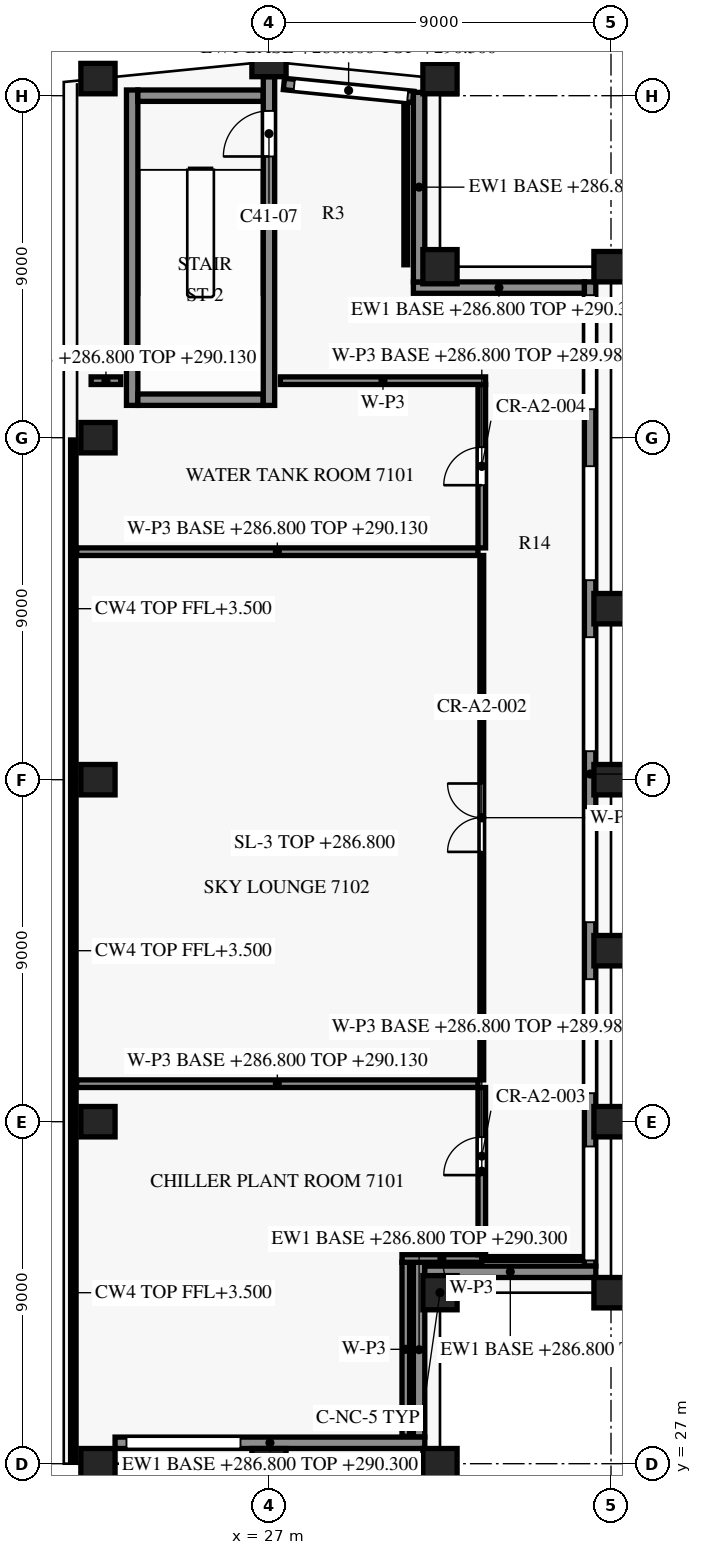
"""IFC4 building model, lengths in metres.
Left out: names, types, materials, properties, quantities, classifications, styles, units other than length and angle.
Written with IfcOpenShell. Run it as: python <this file> out.ifc"""

import sys

from ifc_helpers import new_model, si_unit, direction, frame, frame_2d, origin, origin_2d, place, context, subcontext, project, spatial, rectangle, extrude, element, fill, save


model = new_model("IFC4")
c1 = context("Model", 3, precision=1e-05, world=origin(), true_north=direction((0.0, 1.0)))
c2 = subcontext(c1, "Body", "Model", "MODEL_VIEW")
j1 = project(units=[si_unit("LENGTHUNIT", "METRE"), si_unit("PLANEANGLEUNIT", "RADIAN")], contexts=[c1])
p1 = place(None, origin())
s1 = spatial("IfcSite", under=j1, at=p1, CompositionType="ELEMENT")
p2 = place(p1, origin())
s2 = spatial("IfcBuilding", under=s1, at=p2, CompositionType="ELEMENT")
p3 = place(p2, frame((0.0, 0.0, 286.8)))
s3 = spatial("IfcBuildingStorey", under=s2, at=p3, CompositionType="ELEMENT", Elevation=286.8)
for number, where, z_axis, x_axis in (
    (1, (36.0, 31.5, 0.0), (0.0, 0.0, 1.0), (0.0, 1.0, 0.0)),
    (2, (36.0, 36.0, 0.0), (0.0, 0.0, 1.0), (0.0, 1.0, 0.0)),
    (3, (36.0, 40.5, 0.0), (0.0, 0.0, 1.0), (0.0, 1.0, 0.0)),
    (4, (36.0, 45.0, 0.0), (0.0, 0.0, 1.0), (0.0, 1.0, 0.0)),
    (5, (36.0, 49.5, 0.0), (0.0, 0.0, 1.0), (0.0, 1.0, 0.0)),
    (6, (36.0, 58.5, 0.0), (0.0, 0.0, 1.0), (0.0, 1.0, 0.0)),
    (7, (31.5, 63.45, 0.0), (0.0, 0.0, 1.0), (-0.995, 0.1, 0.0)),
    (8, (27.0, 63.9, 0.0), (0.0, 0.0, 1.0), (-1.0, 0.0, 0.0)),
    (9, (22.5, 63.45, 0.0), (0.0, 0.0, 1.0), (-0.995, -0.1, 0.0)),
    (10, (22.5, 54.0, 0.0), (0.0, 0.0, 1.0), (1.0, 0.0, 0.0)),
    (11, (22.5, 45.0, 0.0), (0.0, 0.0, 1.0), (1.0, 0.0, 0.0)),
    (12, (22.5, 36.0, 0.0), (0.0, 0.0, 1.0), (1.0, 0.0, 0.0)),
):
    element("IfcColumn", number, at=place(p3, frame(where, z_axis=z_axis, x_axis=x_axis)), inside=s3, PredefinedType="COLUMN", context=c2, shape_type="SweptSolid", body=[
        extrude(rectangle(XDim=0.9, YDim=0.8, at=origin_2d()), origin(), (0.0, 0.0, 1.0), 4.0),
    ])
for number, where, z_axis, x_axis in (
    (13, (31.5, 31.5, 0.0), (0.0, 0.0, 1.0), (1.0, 0.0, 0.0)),
    (14, (31.5, 58.5, 0.0), (0.0, 0.0, 1.0), (1.0, 0.0, 0.0)),
):
    element("IfcColumn", number, at=place(p3, frame(where, z_axis=z_axis, x_axis=x_axis)), inside=s3, PredefinedType="COLUMN", context=c2, shape_type="SweptSolid", body=[
        extrude(rectangle(XDim=0.9, YDim=0.9, at=origin_2d()), origin(), (0.0, 0.0, 1.0), 4.0),
    ])
for number, where, z_axis, x_axis in (
    (15, (22.5, 27.0, 0.0), (0.0, 0.0, 1.0), (1.0, 0.0, 0.0)),
    (16, (27.0, 27.0, 0.0), (0.0, 0.0, 1.0), (1.0, 0.0, 0.0)),
    (17, (31.5, 27.0, 0.0), (0.0, 0.0, 1.0), (1.0, 0.0, 0.0)),
):
    element("IfcColumn", number, at=place(p3, frame(where, z_axis=z_axis, x_axis=x_axis)), inside=s3, PredefinedType="COLUMN", context=c2, shape_type="SweptSolid", body=[
        extrude(rectangle(XDim=0.9, YDim=0.8, at=origin_2d()), origin(), (0.0, 0.0, 1.0), 4.0),
    ])
p4 = place(p3, frame((31.1, 27.55, 0.0), z_axis=(0.0, 0.0, 1.0), x_axis=(-1.0, 0.0, 0.0)))
e18 = element("IfcWall", 18, at=p4, inside=s3, PredefinedType="SOLIDWALL", context=c2, shape_type="SweptSolid", body=[
    extrude(rectangle(XDim=8.15, YDim=0.3, at=frame_2d((4.075, 0.0))), origin(), (0.0, 0.0, 1.0), 3.5),
])
p5 = place(p4, frame((4.85, 0.0, 0.9)))
e19 = element("IfcOpeningElement", 19, at=p5, cuts=e18, PredefinedType="OPENING", context=c2, shape_type="SweptSolid", body=[
    extrude(rectangle(XDim=3.0, YDim=1.8, at=frame_2d((1.5, 0.9))), frame((0.0, 0.16, 0.0), z_axis=(0.0, -1.0, 0.0), x_axis=(1.0, 0.0, 0.0)), (0.0, 0.0, 1.0), 0.32),
])
p6 = place(p3, frame((30.95, 32.3, 0.0), z_axis=(0.0, 0.0, 1.0), x_axis=(0.0, -1.0, 0.0)))
e20 = element("IfcWall", 20, at=p6, inside=s3, PredefinedType="SOLIDWALL", context=c2, shape_type="SweptSolid", body=[
    extrude(rectangle(XDim=4.6, YDim=0.3, at=frame_2d((2.3, 0.0))), origin(), (0.0, 0.0, 1.0), 3.5),
])
p7 = place(p3, frame((35.6, 32.05, 0.0), z_axis=(0.0, 0.0, 1.0), x_axis=(-1.0, 0.0, 0.0)))
e21 = element("IfcWall", 21, at=p7, inside=s3, PredefinedType="SOLIDWALL", context=c2, shape_type="SweptSolid", body=[
    extrude(rectangle(XDim=4.5, YDim=0.3, at=frame_2d((2.25, 0.0))), origin(), (0.0, 0.0, 1.0), 3.5),
])
p8 = place(p3, frame((35.45, 58.1, 0.0), z_axis=(0.0, 0.0, 1.0), x_axis=(0.0, -1.0, 0.0)))
e22 = element("IfcWall", 22, at=p8, inside=s3, PredefinedType="SOLIDWALL", context=c2, shape_type="SweptSolid", body=[
    extrude(rectangle(XDim=25.902, YDim=0.3, at=frame_2d((12.951, 0.0))), origin(), (0.0, 0.0, 1.0), 3.5),
])
p9 = place(p8, frame((0.35, 0.0, 0.9)))
e23 = element("IfcOpeningElement", 23, at=p9, cuts=e22, PredefinedType="OPENING", context=c2, shape_type="SweptSolid", body=[
    extrude(rectangle(XDim=3.0, YDim=1.8, at=frame_2d((1.5, 0.9))), frame((0.0, 0.16, 0.0), z_axis=(0.0, -1.0, 0.0), x_axis=(1.0, 0.0, 0.0)), (0.0, 0.0, 1.0), 0.32),
])
p10 = place(p8, frame((4.85, 0.0, 0.9)))
e24 = element("IfcOpeningElement", 24, at=p10, cuts=e22, PredefinedType="OPENING", context=c2, shape_type="SweptSolid", body=[
    extrude(rectangle(XDim=3.0, YDim=1.8, at=frame_2d((1.5, 0.9))), frame((0.0, 0.16, 0.0), z_axis=(0.0, -1.0, 0.0), x_axis=(1.0, 0.0, 0.0)), (0.0, 0.0, 1.0), 0.32),
])
p11 = place(p8, frame((9.35, 0.0, 0.9)))
e25 = element("IfcOpeningElement", 25, at=p11, cuts=e22, PredefinedType="OPENING", context=c2, shape_type="SweptSolid", body=[
    extrude(rectangle(XDim=3.0, YDim=1.8, at=frame_2d((1.5, 0.9))), frame((0.0, 0.16, 0.0), z_axis=(0.0, -1.0, 0.0), x_axis=(1.0, 0.0, 0.0)), (0.0, 0.0, 1.0), 0.32),
])
p12 = place(p8, frame((13.85, 0.0, 0.9)))
e26 = element("IfcOpeningElement", 26, at=p12, cuts=e22, PredefinedType="OPENING", context=c2, shape_type="SweptSolid", body=[
    extrude(rectangle(XDim=3.0, YDim=1.8, at=frame_2d((1.5, 0.9))), frame((0.0, 0.16, 0.0), z_axis=(0.0, -1.0, 0.0), x_axis=(1.0, 0.0, 0.0)), (0.0, 0.0, 1.0), 0.32),
])
p13 = place(p8, frame((18.35, 0.0, 0.9)))
e27 = element("IfcOpeningElement", 27, at=p13, cuts=e22, PredefinedType="OPENING", context=c2, shape_type="SweptSolid", body=[
    extrude(rectangle(XDim=3.0, YDim=1.8, at=frame_2d((1.5, 0.9))), frame((0.0, 0.16, 0.0), z_axis=(0.0, -1.0, 0.0), x_axis=(1.0, 0.0, 0.0)), (0.0, 0.0, 1.0), 0.32),
])
p14 = place(p8, frame((22.752, 0.0, 0.9)))
e28 = element("IfcOpeningElement", 28, at=p14, cuts=e22, PredefinedType="OPENING", context=c2, shape_type="SweptSolid", body=[
    extrude(rectangle(XDim=3.0, YDim=1.8, at=frame_2d((1.5, 0.9))), frame((0.0, 0.16, 0.0), z_axis=(0.0, -1.0, 0.0), x_axis=(1.0, 0.0, 0.0)), (0.0, 0.0, 1.0), 0.32),
])
p15 = place(p3, frame((30.8, 57.95, 0.0), z_axis=(0.0, 0.0, 1.0), x_axis=(1.0, 0.0, 0.0)))
e29 = element("IfcWall", 29, at=p15, inside=s3, PredefinedType="SOLIDWALL", context=c2, shape_type="SweptSolid", body=[
    extrude(rectangle(XDim=4.502, YDim=0.3, at=frame_2d((2.251, 0.0))), origin(), (0.0, 0.0, 1.0), 3.5),
])
p16 = place(p3, frame((30.95, 63.088, 0.0), z_axis=(0.0, 0.0, 1.0), x_axis=(0.0, -1.0, 0.0)))
e30 = element("IfcWall", 30, at=p16, inside=s3, PredefinedType="SOLIDWALL", context=c2, shape_type="SweptSolid", body=[
    extrude(rectangle(XDim=4.99, YDim=0.3, at=frame_2d((2.495, 0.0))), origin(), (0.0, 0.0, 1.0), 3.5),
])
p17 = place(p3, frame((27.393, 63.308, 0.0), z_axis=(0.0, 0.0, 1.0), x_axis=(0.995030125493, -0.099574340874, 0.0)))
e31 = element("IfcWall", 31, at=p17, inside=s3, PredefinedType="SOLIDWALL", context=c2, shape_type="SweptSolid", body=[
    extrude(rectangle(XDim=3.423, YDim=0.3, at=frame_2d((1.711, 0.0))), origin(), (0.0, 0.0, 1.0), 3.5),
])
p18 = place(p17, frame((0.273, 0.0, 0.9)))
e32 = element("IfcOpeningElement", 32, at=p18, cuts=e31, PredefinedType="OPENING", context=c2, shape_type="SweptSolid", body=[
    extrude(rectangle(XDim=3.0, YDim=1.8, at=frame_2d((1.5, 0.9))), frame((0.0, 0.16, 0.0), z_axis=(0.0, -1.0, 0.0), x_axis=(1.0, 0.0, 0.0)), (0.0, 0.0, 1.0), 0.32),
])
for number, where, z_axis, x_axis in (
    (33, (23.55, 55.0, 0.0), (0.0, 0.0, 1.0), (1.0, 0.0, 0.0)),
    (34, (23.55, 63.0, 0.0), (0.0, 0.0, 1.0), (1.0, 0.0, 0.0)),
):
    element("IfcWall", number, at=place(p3, frame(where, z_axis=z_axis, x_axis=x_axis)), inside=s3, PredefinedType="SHEAR", context=c2, shape_type="SweptSolid", body=[
        extrude(rectangle(XDim=3.3, YDim=0.3, at=frame_2d((1.65, 0.0))), origin(), (0.0, 0.0, 1.0), 3.7),
    ])
p19 = place(p3, frame((23.4, 54.85, 0.0), z_axis=(0.0, 0.0, 1.0), x_axis=(0.0, 1.0, 0.0)))
e35 = element("IfcWall", 35, at=p19, inside=s3, PredefinedType="SHEAR", context=c2, shape_type="SweptSolid", body=[
    extrude(rectangle(XDim=8.3, YDim=0.3, at=frame_2d((4.15, 0.0))), origin(), (0.0, 0.0, 1.0), 3.7),
])
p20 = place(p3, frame((27.0, 54.85, 0.0), z_axis=(0.0, 0.0, 1.0), x_axis=(0.0, 1.0, 0.0)))
e36 = element("IfcWall", 36, at=p20, inside=s3, PredefinedType="SHEAR", context=c2, shape_type="SweptSolid", body=[
    extrude(rectangle(XDim=8.65, YDim=0.3, at=frame_2d((4.325, 0.0))), origin(), (0.0, 0.0, 1.0), 3.7),
])
p21 = place(p20, frame((6.55, 0.0, 0.0)))
e37 = element("IfcOpeningElement", 37, at=p21, cuts=e36, PredefinedType="OPENING", context=c2, shape_type="SweptSolid", body=[
    extrude(rectangle(XDim=1.2, YDim=2.2, at=frame_2d((0.6, 1.1))), frame((0.0, 0.16, 0.0), z_axis=(0.0, -1.0, 0.0), x_axis=(1.0, 0.0, 0.0)), (0.0, 0.0, 1.0), 0.32),
])
p22 = place(p3, frame((30.6, 32.3, 0.0), z_axis=(0.0, 0.0, 1.0), x_axis=(0.0, -1.0, 0.0)))
e38 = element("IfcWall", 38, at=p22, inside=s3, PredefinedType="PARTITIONING", context=c2, shape_type="SweptSolid", body=[
    extrude(rectangle(XDim=4.58, YDim=0.2, at=frame_2d((2.29, 0.0))), origin(), (0.0, 0.0, 1.0), 3.68),
])
p23 = place(p3, frame((32.6, 32.4, 0.0), z_axis=(0.0, 0.0, 1.0), x_axis=(-1.0, 0.0, 0.0)))
e39 = element("IfcWall", 39, at=p23, inside=s3, PredefinedType="PARTITIONING", context=c2, shape_type="SweptSolid", body=[
    extrude(rectangle(XDim=2.1, YDim=0.2, at=frame_2d((1.05, 0.0))), origin(), (0.0, 0.0, 1.0), 3.68),
])
p24 = place(p3, frame((35.28, 32.4, 0.0), z_axis=(0.0, 0.0, 1.0), x_axis=(-1.0, 0.0, 0.0)))
e40 = element("IfcWall", 40, at=p24, inside=s3, PredefinedType="PARTITIONING", context=c2, shape_type="SweptSolid", body=[
    extrude(rectangle(XDim=2.68, YDim=0.1, at=frame_2d((1.34, 0.0))), origin(), (0.0, 0.0, 1.0), 3.68),
])
p25 = place(p3, frame((32.6, 32.5, 0.0), z_axis=(0.0, 0.0, 1.0), x_axis=(0.0, 1.0, 0.0)))
e41 = element("IfcWall", 41, at=p25, inside=s3, PredefinedType="PARTITIONING", context=c2, shape_type="SweptSolid", body=[
    extrude(rectangle(XDim=4.4, YDim=0.2, at=frame_2d((2.2, 0.0))), origin(), (0.0, 0.0, 1.0), 3.18),
])
p26 = place(p25, frame((2.094, 0.0, 0.0)))
e42 = element("IfcOpeningElement", 42, at=p26, cuts=e41, PredefinedType="OPENING", context=c2, shape_type="SweptSolid", body=[
    extrude(rectangle(XDim=1.0, YDim=2.1, at=frame_2d((0.5, 1.05))), frame((0.0, 0.11, 0.0), z_axis=(0.0, -1.0, 0.0), x_axis=(1.0, 0.0, 0.0)), (0.0, 0.0, 1.0), 0.22),
])
p27 = place(p3, frame((32.5, 37.0, 0.0), z_axis=(0.0, 0.0, 1.0), x_axis=(-1.0, 0.0, 0.0)))
e43 = element("IfcWall", 43, at=p27, inside=s3, PredefinedType="PARTITIONING", context=c2, shape_type="SweptSolid", body=[
    extrude(rectangle(XDim=10.56, YDim=0.2, at=frame_2d((5.28, 0.0))), origin(), (0.0, 0.0, 1.0), 3.33),
])
p28 = place(p3, frame((32.6, 37.1, 0.0), z_axis=(0.0, 0.0, 1.0), x_axis=(0.0, 1.0, 0.0)))
e44 = element("IfcWall", 44, at=p28, inside=s3, PredefinedType="PARTITIONING", context=c2, shape_type="SweptSolid", body=[
    extrude(rectangle(XDim=13.8, YDim=0.1, at=frame_2d((6.9, 0.0))), origin(), (0.0, 0.0, 1.0), 3.18),
])
p29 = place(p28, frame((6.0, 0.0, 0.0)))
e45 = element("IfcOpeningElement", 45, at=p29, cuts=e44, PredefinedType="OPENING", context=c2, shape_type="SweptSolid", body=[
    extrude(rectangle(XDim=1.8, YDim=2.1, at=frame_2d((0.9, 1.05))), frame((0.0, 0.06, 0.0), z_axis=(0.0, -1.0, 0.0), x_axis=(1.0, 0.0, 0.0)), (0.0, 0.0, 1.0), 0.12),
])
p30 = place(p3, frame((21.94, 51.0, 0.0), z_axis=(0.0, 0.0, 1.0), x_axis=(1.0, 0.0, 0.0)))
e46 = element("IfcWall", 46, at=p30, inside=s3, PredefinedType="PARTITIONING", context=c2, shape_type="SweptSolid", body=[
    extrude(rectangle(XDim=10.56, YDim=0.2, at=frame_2d((5.28, 0.0))), origin(), (0.0, 0.0, 1.0), 3.33),
])
p31 = place(p3, frame((32.6, 51.1, 0.0), z_axis=(0.0, 0.0, 1.0), x_axis=(0.0, 1.0, 0.0)))
e47 = element("IfcWall", 47, at=p31, inside=s3, PredefinedType="PARTITIONING", context=c2, shape_type="SweptSolid", body=[
    extrude(rectangle(XDim=4.3, YDim=0.2, at=frame_2d((2.15, 0.0))), origin(), (0.0, 0.0, 1.0), 3.18),
])
p32 = place(p31, frame((1.65, 0.0, 0.0)))
e48 = element("IfcOpeningElement", 48, at=p32, cuts=e47, PredefinedType="OPENING", context=c2, shape_type="SweptSolid", body=[
    extrude(rectangle(XDim=1.0, YDim=2.1, at=frame_2d((0.5, 1.05))), frame((0.0, 0.11, 0.0), z_axis=(0.0, -1.0, 0.0), x_axis=(1.0, 0.0, 0.0)), (0.0, 0.0, 1.0), 0.22),
])
p33 = place(p3, frame((22.32, 55.5, 0.0), z_axis=(0.0, 0.0, 1.0), x_axis=(1.0, 0.0, 0.0)))
e49 = element("IfcWall", 49, at=p33, inside=s3, PredefinedType="PARTITIONING", context=c2, shape_type="SweptSolid", body=[
    extrude(rectangle(XDim=0.78, YDim=0.2, at=frame_2d((0.39, 0.0))), origin(), (0.0, 0.0, 1.0), 3.33),
])
p34 = place(p3, frame((32.7, 55.5, 0.0), z_axis=(0.0, 0.0, 1.0), x_axis=(-1.0, 0.0, 0.0)))
e50 = element("IfcWall", 50, at=p34, inside=s3, PredefinedType="PARTITIONING", context=c2, shape_type="SweptSolid", body=[
    extrude(rectangle(XDim=5.4, YDim=0.2, at=frame_2d((2.7, 0.0))), origin(), (0.0, 0.0, 1.0), 3.68),
])
p35 = place(p3, frame((30.6, 62.816, 0.0), z_axis=(0.0, 0.0, 1.0), x_axis=(0.0, -1.0, 0.0)))
e51 = element("IfcWall", 51, at=p35, inside=s3, PredefinedType="PARTITIONING", context=c2, shape_type="SweptSolid", body=[
    extrude(rectangle(XDim=4.266, YDim=0.1, at=frame_2d((2.133, 0.0))), origin(), (0.0, 0.0, 1.0), 3.68),
])
p36 = place(p5, origin())
e52 = element("IfcWindow", 52, at=p36, inside=s3, PartitioningType="SINGLE_PANEL", PredefinedType="WINDOW", context=c2, shape_type="SweptSolid", body=[
    extrude(rectangle(XDim=3.0, YDim=1.8, at=frame_2d((1.5, 0.9))), frame((0.0, 0.03, 0.0), z_axis=(0.0, -1.0, 0.0), x_axis=(1.0, 0.0, 0.0)), (0.0, 0.0, 1.0), 0.06),
])
fill(e19, e52)
p37 = place(p9, origin())
e53 = element("IfcWindow", 53, at=p37, inside=s3, PartitioningType="SINGLE_PANEL", PredefinedType="WINDOW", context=c2, shape_type="SweptSolid", body=[
    extrude(rectangle(XDim=3.0, YDim=1.8, at=frame_2d((1.5, 0.9))), frame((0.0, 0.03, 0.0), z_axis=(0.0, -1.0, 0.0), x_axis=(1.0, 0.0, 0.0)), (0.0, 0.0, 1.0), 0.06),
])
fill(e23, e53)
p38 = place(p10, origin())
e54 = element("IfcWindow", 54, at=p38, inside=s3, PartitioningType="SINGLE_PANEL", PredefinedType="WINDOW", context=c2, shape_type="SweptSolid", body=[
    extrude(rectangle(XDim=3.0, YDim=1.8, at=frame_2d((1.5, 0.9))), frame((0.0, 0.03, 0.0), z_axis=(0.0, -1.0, 0.0), x_axis=(1.0, 0.0, 0.0)), (0.0, 0.0, 1.0), 0.06),
])
fill(e24, e54)
p39 = place(p11, origin())
e55 = element("IfcWindow", 55, at=p39, inside=s3, PartitioningType="SINGLE_PANEL", PredefinedType="WINDOW", context=c2, shape_type="SweptSolid", body=[
    extrude(rectangle(XDim=3.0, YDim=1.8, at=frame_2d((1.5, 0.9))), frame((0.0, 0.03, 0.0), z_axis=(0.0, -1.0, 0.0), x_axis=(1.0, 0.0, 0.0)), (0.0, 0.0, 1.0), 0.06),
])
fill(e25, e55)
p40 = place(p12, origin())
e56 = element("IfcWindow", 56, at=p40, inside=s3, PartitioningType="SINGLE_PANEL", PredefinedType="WINDOW", context=c2, shape_type="SweptSolid", body=[
    extrude(rectangle(XDim=3.0, YDim=1.8, at=frame_2d((1.5, 0.9))), frame((0.0, 0.03, 0.0), z_axis=(0.0, -1.0, 0.0), x_axis=(1.0, 0.0, 0.0)), (0.0, 0.0, 1.0), 0.06),
])
fill(e26, e56)
p41 = place(p13, origin())
e57 = element("IfcWindow", 57, at=p41, inside=s3, PartitioningType="SINGLE_PANEL", PredefinedType="WINDOW", context=c2, shape_type="SweptSolid", body=[
    extrude(rectangle(XDim=3.0, YDim=1.8, at=frame_2d((1.5, 0.9))), frame((0.0, 0.03, 0.0), z_axis=(0.0, -1.0, 0.0), x_axis=(1.0, 0.0, 0.0)), (0.0, 0.0, 1.0), 0.06),
])
fill(e27, e57)
p42 = place(p14, origin())
e58 = element("IfcWindow", 58, at=p42, inside=s3, PartitioningType="SINGLE_PANEL", PredefinedType="WINDOW", context=c2, shape_type="SweptSolid", body=[
    extrude(rectangle(XDim=3.0, YDim=1.8, at=frame_2d((1.5, 0.9))), frame((0.0, 0.03, 0.0), z_axis=(0.0, -1.0, 0.0), x_axis=(1.0, 0.0, 0.0)), (0.0, 0.0, 1.0), 0.06),
])
fill(e28, e58)
p43 = place(p18, origin())
e59 = element("IfcWindow", 59, at=p43, inside=s3, PartitioningType="SINGLE_PANEL", PredefinedType="WINDOW", context=c2, shape_type="SweptSolid", body=[
    extrude(rectangle(XDim=3.0, YDim=1.8, at=frame_2d((1.5, 0.9))), frame((0.0, 0.03, 0.0), z_axis=(0.0, -1.0, 0.0), x_axis=(1.0, 0.0, 0.0)), (0.0, 0.0, 1.0), 0.06),
])
fill(e32, e59)
p44 = place(p21, origin())
e60 = element("IfcDoor", 60, at=p44, inside=s3, OperationType="SINGLE_SWING_LEFT", PredefinedType="DOOR", context=c2, shape_type="SweptSolid", body=[
    extrude(rectangle(XDim=1.2, YDim=2.2, at=frame_2d((0.6, 1.1))), frame((0.0, 0.025, 0.0), z_axis=(0.0, -1.0, 0.0), x_axis=(1.0, 0.0, 0.0)), (0.0, 0.0, 1.0), 0.05),
])
fill(e37, e60)
p45 = place(p29, origin())
e61 = element("IfcDoor", 61, at=p45, inside=s3, OperationType="DOUBLE_DOOR_SINGLE_SWING", PredefinedType="DOOR", context=c2, shape_type="SweptSolid", body=[
    extrude(rectangle(XDim=1.8, YDim=2.1, at=frame_2d((0.9, 1.05))), frame((0.0, 0.025, 0.0), z_axis=(0.0, -1.0, 0.0), x_axis=(1.0, 0.0, 0.0)), (0.0, 0.0, 1.0), 0.05),
])
fill(e45, e61)
p46 = place(p26, origin())
e62 = element("IfcDoor", 62, at=p46, inside=s3, OperationType="SINGLE_SWING_RIGHT", PredefinedType="DOOR", context=c2, shape_type="SweptSolid", body=[
    extrude(rectangle(XDim=1.0, YDim=2.1, at=frame_2d((0.5, 1.05))), frame((0.0, 0.025, 0.0), z_axis=(0.0, -1.0, 0.0), x_axis=(1.0, 0.0, 0.0)), (0.0, 0.0, 1.0), 0.05),
])
fill(e42, e62)
p47 = place(p32, origin())
e63 = element("IfcDoor", 63, at=p47, inside=s3, OperationType="SINGLE_SWING_RIGHT", PredefinedType="DOOR", context=c2, shape_type="SweptSolid", body=[
    extrude(rectangle(XDim=1.0, YDim=2.1, at=frame_2d((0.5, 1.05))), frame((0.0, 0.025, 0.0), z_axis=(0.0, -1.0, 0.0), x_axis=(1.0, 0.0, 0.0)), (0.0, 0.0, 1.0), 0.05),
])
fill(e48, e63)
save(model, sys.argv[1])
